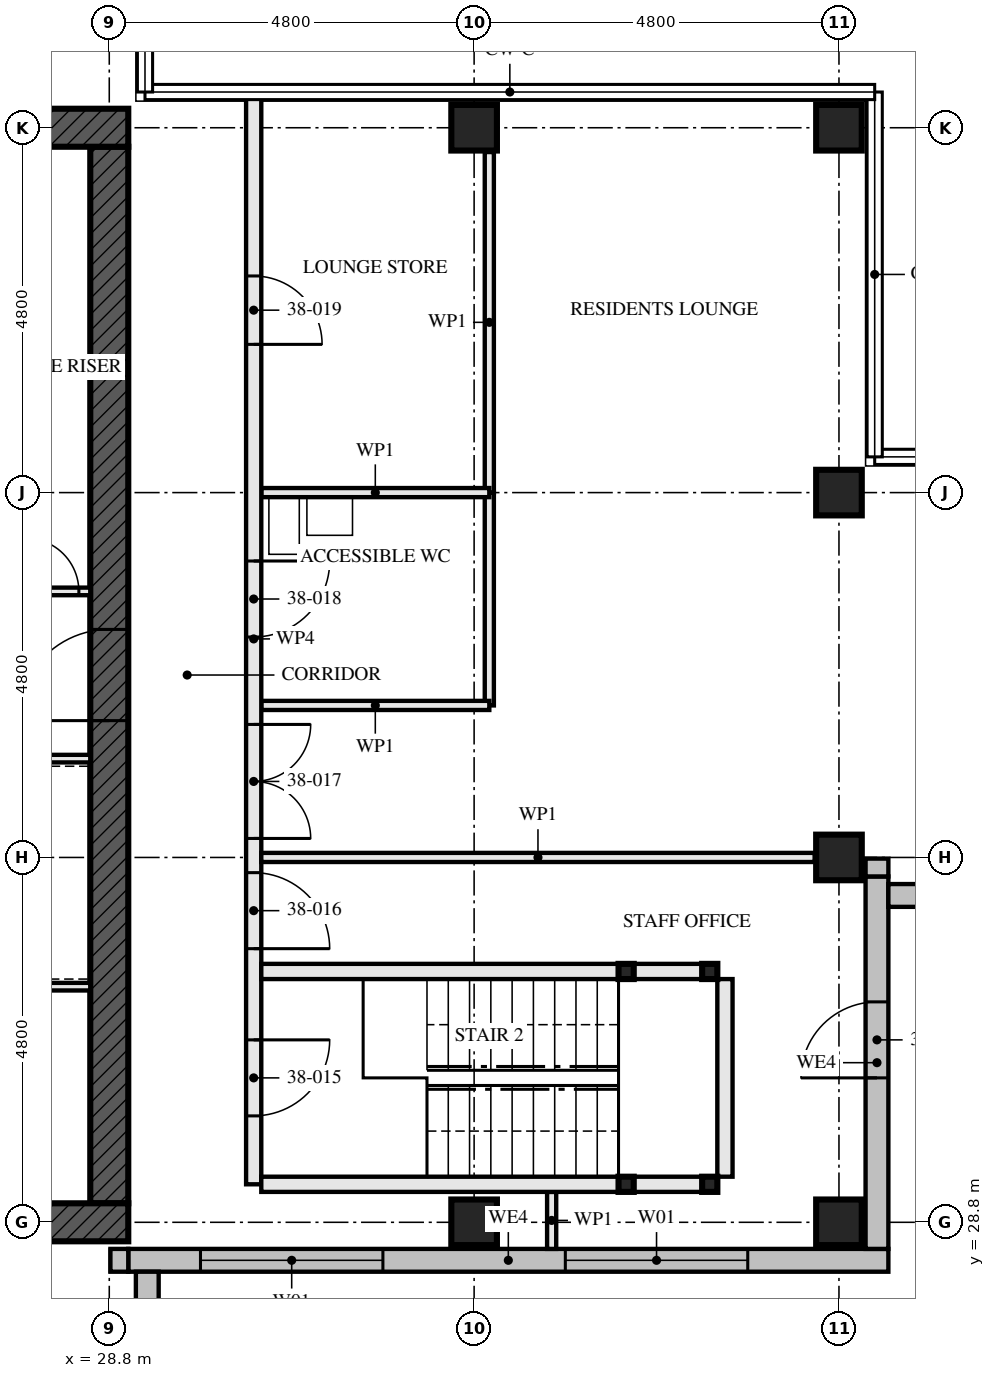
"""IFC4 building model, lengths in metres.
Left out: names, types, materials, properties, quantities, classifications, styles, units other than length and angle.
Written with IfcOpenShell. Run it as: python <this file> out.ifc"""

import sys

from ifc_helpers import new_model, si_unit, direction, frame, frame_2d, origin, origin_2d, place, context, subcontext, project, spatial, rectangle, hollow_rectangle, extrude, element, fill, save


model = new_model("IFC4")
c1 = context("Model", 3, precision=1e-05, world=origin(), true_north=direction((0.0, 1.0)))
c2 = subcontext(c1, "Body", "Model", "MODEL_VIEW")
j1 = project(units=[si_unit("LENGTHUNIT", "METRE"), si_unit("PLANEANGLEUNIT", "RADIAN")], contexts=[c1])
p1 = place(None, origin())
s1 = spatial("IfcSite", under=j1, at=p1, CompositionType="ELEMENT")
p2 = place(p1, origin())
s2 = spatial("IfcBuilding", under=s1, at=p2, CompositionType="ELEMENT")
p3 = place(p2, frame((0.0, 0.0, 141.0)))
s3 = spatial("IfcBuildingStorey", under=s2, at=p3, CompositionType="ELEMENT", Elevation=141.0)
for number, where, z_axis, x_axis in (
    (1, (33.6, 28.8, 0.0), (0.0, 0.0, 1.0), (0.0, 1.0, 0.0)),
    (2, (33.6, 43.2, 0.0), (0.0, 0.0, 1.0), (0.0, 1.0, 0.0)),
    (3, (38.4, 28.8, 0.0), (0.0, 0.0, 1.0), (0.0, 1.0, 0.0)),
    (4, (38.4, 33.6, 0.0), (0.0, 0.0, 1.0), (0.0, 1.0, 0.0)),
    (5, (38.4, 38.4, 0.0), (0.0, 0.0, 1.0), (0.0, 1.0, 0.0)),
    (6, (38.4, 43.2, 0.0), (0.0, 0.0, 1.0), (0.0, 1.0, 0.0)),
):
    element("IfcColumn", number, at=place(p3, frame(where, z_axis=z_axis, x_axis=x_axis)), inside=s3, PredefinedType="COLUMN", context=c2, shape_type="SweptSolid", body=[
        extrude(hollow_rectangle(XDim=0.6, YDim=0.6, WallThickness=0.08, at=origin_2d()), origin(), (0.0, 0.0, 1.0), 3.5),
    ])
p4 = place(p3, frame((14.15, 28.8, -0.17), z_axis=(0.0, 0.0, 1.0), x_axis=(1.0, 0.0, 0.0)))
e7 = element("IfcWall", 7, at=p4, inside=s3, PredefinedType="SHEAR", context=c2, shape_type="SweptSolid", body=[
    extrude(rectangle(XDim=14.9, YDim=0.5, at=frame_2d((7.45, 0.0))), origin(), (0.0, 0.0, 1.0), 3.5),
])
p5 = place(p4, frame((6.85, 0.0, 0.17)))
e8 = element("IfcOpeningElement", 8, at=p5, cuts=e7, PredefinedType="OPENING", context=c2, shape_type="SweptSolid", body=[
    extrude(rectangle(XDim=1.2, YDim=2.1, at=frame_2d((0.6, 1.05))), frame((0.0, 0.26, 0.0), z_axis=(0.0, -1.0, 0.0), x_axis=(1.0, 0.0, 0.0)), (0.0, 0.0, 1.0), 0.521),
])
p6 = place(p3, frame((29.05, 43.2, -0.17), z_axis=(0.0, 0.0, 1.0), x_axis=(-1.0, 0.0, 0.0)))
e9 = element("IfcWall", 9, at=p6, inside=s3, PredefinedType="SHEAR", context=c2, shape_type="SweptSolid", body=[
    extrude(rectangle(XDim=14.9, YDim=0.5, at=frame_2d((7.45, 0.0))), origin(), (0.0, 0.0, 1.0), 3.5),
])
p7 = place(p6, frame((6.85, 0.0, 0.17)))
e10 = element("IfcOpeningElement", 10, at=p7, cuts=e9, PredefinedType="OPENING", context=c2, shape_type="SweptSolid", body=[
    extrude(rectangle(XDim=1.2, YDim=2.1, at=frame_2d((0.6, 1.05))), frame((0.0, 0.26, 0.0), z_axis=(0.0, -1.0, 0.0), x_axis=(1.0, 0.0, 0.0)), (0.0, 0.0, 1.0), 0.521),
])
p8 = place(p3, frame((28.8, 29.05, -0.17), z_axis=(0.0, 0.0, 1.0), x_axis=(0.0, 1.0, 0.0)))
e11 = element("IfcWall", 11, at=p8, inside=s3, PredefinedType="SHEAR", context=c2, shape_type="SweptSolid", body=[
    extrude(rectangle(XDim=13.9, YDim=0.5, at=frame_2d((6.95, 0.0))), origin(), (0.0, 0.0, 1.0), 3.5),
])
p9 = place(p8, frame((6.35, 0.0, 0.17)))
e12 = element("IfcOpeningElement", 12, at=p9, cuts=e11, PredefinedType="OPENING", context=c2, shape_type="SweptSolid", body=[
    extrude(rectangle(XDim=1.2, YDim=2.1, at=frame_2d((0.6, 1.05))), frame((0.0, 0.26, 0.0), z_axis=(0.0, -1.0, 0.0), x_axis=(1.0, 0.0, 0.0)), (0.0, 0.0, 1.0), 0.521),
])
for number, where, z_axis, x_axis in (
    (13, (36.7, 29.3, 0.0), (0.0, 0.0, 1.0), (1.0, 0.0, 0.0)),
    (14, (36.7, 32.1, 0.0), (0.0, 0.0, 1.0), (1.0, 0.0, 0.0)),
    (15, (35.6, 29.3, 0.0), (0.0, 0.0, 1.0), (1.0, 0.0, 0.0)),
    (16, (35.6, 32.1, 0.0), (0.0, 0.0, 1.0), (1.0, 0.0, 0.0)),
):
    element("IfcColumn", number, at=place(p3, frame(where, z_axis=z_axis, x_axis=x_axis)), inside=s3, PredefinedType="COLUMN", context=c2, shape_type="SweptSolid", body=[
        extrude(hollow_rectangle(XDim=0.2, YDim=0.2, WallThickness=0.008, at=origin_2d()), origin(), (0.0, 0.0, 1.0), 3.33),
    ])
p10 = place(p3, frame((29.05, 28.3, 0.0), z_axis=(0.0, 0.0, 1.0), x_axis=(1.0, 0.0, 0.0)))
e17 = element("IfcWall", 17, at=p10, inside=s3, PredefinedType="SOLIDWALL", context=c2, shape_type="SweptSolid", body=[
    extrude(rectangle(XDim=10.0, YDim=0.3, at=frame_2d((5.0, 0.0))), origin(), (0.0, 0.0, 1.0), 3.5),
])
p11 = place(p10, frame((0.95, 0.0, 0.6)))
e18 = element("IfcOpeningElement", 18, at=p11, cuts=e17, PredefinedType="OPENING", context=c2, shape_type="SweptSolid", body=[
    extrude(rectangle(XDim=2.4, YDim=1.8, at=frame_2d((1.2, 0.9))), frame((0.0, 0.161, 0.0), z_axis=(0.0, -1.0, 0.0), x_axis=(1.0, 0.0, 0.0)), (0.0, 0.0, 1.0), 0.321),
])
p12 = place(p10, frame((5.75, 0.0, 0.6)))
e19 = element("IfcOpeningElement", 19, at=p12, cuts=e17, PredefinedType="OPENING", context=c2, shape_type="SweptSolid", body=[
    extrude(rectangle(XDim=2.4, YDim=1.8, at=frame_2d((1.2, 0.9))), frame((0.0, 0.161, 0.0), z_axis=(0.0, -1.0, 0.0), x_axis=(1.0, 0.0, 0.0)), (0.0, 0.0, 1.0), 0.321),
])
p13 = place(p3, frame((38.9, 28.45, 0.0), z_axis=(0.0, 0.0, 1.0), x_axis=(0.0, 1.0, 0.0)))
e20 = element("IfcWall", 20, at=p13, inside=s3, PredefinedType="SOLIDWALL", context=c2, shape_type="SweptSolid", body=[
    extrude(rectangle(XDim=4.9, YDim=0.3, at=frame_2d((2.45, 0.0))), origin(), (0.0, 0.0, 1.0), 3.5),
])
p14 = place(p13, frame((2.25, 0.0, 0.0)))
e21 = element("IfcOpeningElement", 21, at=p14, cuts=e20, PredefinedType="OPENING", context=c2, shape_type="SweptSolid", body=[
    extrude(rectangle(XDim=1.0, YDim=2.4, at=frame_2d((0.5, 1.2))), frame((0.0, 0.161, 0.0), z_axis=(0.0, -1.0, 0.0), x_axis=(1.0, 0.0, 0.0)), (0.0, 0.0, 1.0), 0.321),
])
p15 = place(p3, frame((39.05, 33.1, 0.0), z_axis=(0.0, 0.0, 1.0), x_axis=(1.0, 0.0, 0.0)))
e22 = element("IfcWall", 22, at=p15, inside=s3, PredefinedType="SOLIDWALL", context=c2, shape_type="SweptSolid", body=[
    extrude(rectangle(XDim=4.5, YDim=0.3, at=frame_2d((2.25, 0.0))), origin(), (0.0, 0.0, 1.0), 3.5),
])
p16 = place(p15, frame((1.25, 0.0, 0.0)))
e23 = element("IfcOpeningElement", 23, at=p16, cuts=e22, PredefinedType="OPENING", context=c2, shape_type="SweptSolid", body=[
    extrude(rectangle(XDim=1.0, YDim=2.4, at=frame_2d((0.5, 1.2))), frame((0.0, 0.161, 0.0), z_axis=(0.0, -1.0, 0.0), x_axis=(1.0, 0.0, 0.0)), (0.0, 0.0, 1.0), 0.321),
])
p17 = place(p3, frame((29.3, 18.85, 0.0), z_axis=(0.0, 0.0, 1.0), x_axis=(0.0, 1.0, 0.0)))
e24 = element("IfcWall", 24, at=p17, inside=s3, PredefinedType="SOLIDWALL", context=c2, shape_type="SweptSolid", body=[
    extrude(rectangle(XDim=9.3, YDim=0.3, at=frame_2d((4.65, 0.0))), origin(), (0.0, 0.0, 1.0), 3.5),
])
p18 = place(p17, frame((2.25, 0.0, 0.0)))
e25 = element("IfcOpeningElement", 25, at=p18, cuts=e24, PredefinedType="OPENING", context=c2, shape_type="SweptSolid", body=[
    extrude(rectangle(XDim=1.0, YDim=2.4, at=frame_2d((0.5, 1.2))), frame((0.0, 0.161, 0.0), z_axis=(0.0, -1.0, 0.0), x_axis=(1.0, 0.0, 0.0)), (0.0, 0.0, 1.0), 0.321),
])
p19 = place(p17, frame((6.35, 0.0, 0.6)))
e26 = element("IfcOpeningElement", 26, at=p19, cuts=e24, PredefinedType="OPENING", context=c2, shape_type="SweptSolid", body=[
    extrude(rectangle(XDim=2.4, YDim=1.8, at=frame_2d((1.2, 0.9))), frame((0.0, 0.161, 0.0), z_axis=(0.0, -1.0, 0.0), x_axis=(1.0, 0.0, 0.0)), (0.0, 0.0, 1.0), 0.321),
])
p20 = place(p3, frame((28.815, 28.3, 2.39), z_axis=(0.0, 0.0, 1.0), x_axis=(1.0, 0.0, 0.0)))
e27 = element("IfcWall", 27, at=p20, inside=s3, PredefinedType="SOLIDWALL", context=c2, shape_type="SweptSolid", body=[
    extrude(rectangle(XDim=0.235, YDim=0.3, at=frame_2d((0.118, 0.0))), origin(), (0.0, 0.0, 1.0), 0.88),
])
p21 = place(p3, frame((38.9, 33.35, 2.39), z_axis=(0.0, 0.0, 1.0), x_axis=(0.0, 1.0, 0.0)))
e28 = element("IfcWall", 28, at=p21, inside=s3, PredefinedType="SOLIDWALL", context=c2, shape_type="SweptSolid", body=[
    extrude(rectangle(XDim=0.235, YDim=0.3, at=frame_2d((0.117, 0.0))), origin(), (0.0, 0.0, 1.0), 0.88),
])
p22 = place(p3, frame((36.6, 29.3, 0.0), z_axis=(0.0, 0.0, 1.0), x_axis=(-1.0, 0.0, 0.0)))
e29 = element("IfcWall", 29, at=p22, inside=s3, PredefinedType="SOLIDWALL", context=c2, shape_type="SweptSolid", body=[
    extrude(rectangle(XDim=0.9, YDim=0.2, at=frame_2d((0.45, 0.0))), origin(), (0.0, 0.0, 1.0), 2.99),
])
p23 = place(p3, frame((35.5, 29.3, 0.0), z_axis=(0.0, 0.0, 1.0), x_axis=(-1.0, 0.0, 0.0)))
e30 = element("IfcWall", 30, at=p23, inside=s3, PredefinedType="SOLIDWALL", context=c2, shape_type="SweptSolid", body=[
    extrude(rectangle(XDim=4.7, YDim=0.2, at=frame_2d((2.35, 0.0))), origin(), (0.0, 0.0, 1.0), 2.99),
])
p24 = place(p3, frame((36.6, 32.1, 0.0), z_axis=(0.0, 0.0, 1.0), x_axis=(-1.0, 0.0, 0.0)))
e31 = element("IfcWall", 31, at=p24, inside=s3, PredefinedType="SOLIDWALL", context=c2, shape_type="SweptSolid", body=[
    extrude(rectangle(XDim=0.9, YDim=0.2, at=frame_2d((0.45, 0.0))), origin(), (0.0, 0.0, 1.0), 2.99),
])
p25 = place(p3, frame((35.5, 32.1, 0.0), z_axis=(0.0, 0.0, 1.0), x_axis=(-1.0, 0.0, 0.0)))
e32 = element("IfcWall", 32, at=p25, inside=s3, PredefinedType="SOLIDWALL", context=c2, shape_type="SweptSolid", body=[
    extrude(rectangle(XDim=4.7, YDim=0.2, at=frame_2d((2.35, 0.0))), origin(), (0.0, 0.0, 1.0), 2.99),
])
p26 = place(p3, frame((36.9, 29.4, 0.0), z_axis=(0.0, 0.0, 1.0), x_axis=(0.0, 1.0, 0.0)))
e33 = element("IfcWall", 33, at=p26, inside=s3, PredefinedType="SOLIDWALL", context=c2, shape_type="SweptSolid", body=[
    extrude(rectangle(XDim=2.6, YDim=0.2, at=frame_2d((1.3, 0.0))), origin(), (0.0, 0.0, 1.0), 3.33),
])
p27 = place(p3, frame((33.8, 35.6, 0.0), z_axis=(0.0, 0.0, 1.0), x_axis=(-1.0, 0.0, 0.0)))
e34 = element("IfcWall", 34, at=p27, inside=s3, PredefinedType="PARTITIONING", context=c2, shape_type="SweptSolid", body=[
    extrude(rectangle(XDim=3.0, YDim=0.12, at=frame_2d((1.5, 0.0))), origin(), (0.0, 0.0, 1.0), 3.33),
])
p28 = place(p3, frame((33.8, 35.6, 0.0), z_axis=(0.0, 0.0, 1.0), x_axis=(0.0, 1.0, 0.0)))
e35 = element("IfcWall", 35, at=p28, inside=s3, PredefinedType="PARTITIONING", context=c2, shape_type="SweptSolid", body=[
    extrude(rectangle(XDim=2.8, YDim=0.12, at=frame_2d((1.4, 0.0))), origin(), (0.0, 0.0, 1.0), 3.33),
])
p29 = place(p3, frame((33.8, 38.4, 0.0), z_axis=(0.0, 0.0, 1.0), x_axis=(-1.0, 0.0, 0.0)))
e36 = element("IfcWall", 36, at=p29, inside=s3, PredefinedType="PARTITIONING", context=c2, shape_type="SweptSolid", body=[
    extrude(rectangle(XDim=3.0, YDim=0.12, at=frame_2d((1.5, 0.0))), origin(), (0.0, 0.0, 1.0), 2.55),
])
p30 = place(p3, frame((33.8, 38.4, 0.0), z_axis=(0.0, 0.0, 1.0), x_axis=(0.0, 1.0, 0.0)))
e37 = element("IfcWall", 37, at=p30, inside=s3, PredefinedType="PARTITIONING", context=c2, shape_type="SweptSolid", body=[
    extrude(rectangle(XDim=4.48, YDim=0.12, at=frame_2d((2.24, 0.0))), origin(), (0.0, 0.0, 1.0), 3.33),
])
p31 = place(p3, frame((38.08, 33.6, 0.0), z_axis=(0.0, 0.0, 1.0), x_axis=(-1.0, 0.0, 0.0)))
e38 = element("IfcWall", 38, at=p31, inside=s3, PredefinedType="PARTITIONING", context=c2, shape_type="SweptSolid", body=[
    extrude(rectangle(XDim=7.28, YDim=0.12, at=frame_2d((3.64, 0.0))), origin(), (0.0, 0.0, 1.0), 2.55),
])
p32 = place(p3, frame((34.62, 28.45, 0.0), z_axis=(0.0, 0.0, 1.0), x_axis=(0.0, 1.0, 0.0)))
e39 = element("IfcWall", 39, at=p32, inside=s3, PredefinedType="PARTITIONING", context=c2, shape_type="SweptSolid", body=[
    extrude(rectangle(XDim=0.75, YDim=0.12, at=frame_2d((0.375, 0.0))), origin(), (0.0, 0.0, 1.0), 2.32),
])
p33 = place(p3, frame((30.7, 29.3, 0.0), z_axis=(0.0, 0.0, 1.0), x_axis=(0.0, 1.0, 0.0)))
e40 = element("IfcWall", 40, at=p33, inside=s3, PredefinedType="PARTITIONING", context=c2, shape_type="SweptSolid", body=[
    extrude(rectangle(XDim=14.35, YDim=0.2, at=frame_2d((7.175, 0.0))), origin(), (0.0, 0.0, 1.0), 2.32),
])
p34 = place(p33, frame((0.9, 0.0, 0.0)))
e41 = element("IfcOpeningElement", 41, at=p34, cuts=e40, PredefinedType="OPENING", context=c2, shape_type="SweptSolid", body=[
    extrude(rectangle(XDim=1.0, YDim=2.1, at=frame_2d((0.5, 1.05))), frame((0.0, 0.111, 0.0), z_axis=(0.0, -1.0, 0.0), x_axis=(1.0, 0.0, 0.0)), (0.0, 0.0, 1.0), 0.221),
])
p35 = place(p33, frame((3.1, 0.0, 0.0)))
e42 = element("IfcOpeningElement", 42, at=p35, cuts=e40, PredefinedType="OPENING", context=c2, shape_type="SweptSolid", body=[
    extrude(rectangle(XDim=1.0, YDim=2.0, at=frame_2d((0.5, 1.0))), frame((0.0, 0.111, 0.0), z_axis=(0.0, -1.0, 0.0), x_axis=(1.0, 0.0, 0.0)), (0.0, 0.0, 1.0), 0.221),
])
p36 = place(p33, frame((4.55, 0.0, 0.0)))
e43 = element("IfcOpeningElement", 43, at=p36, cuts=e40, PredefinedType="OPENING", context=c2, shape_type="SweptSolid", body=[
    extrude(rectangle(XDim=1.5, YDim=2.1, at=frame_2d((0.75, 1.05))), frame((0.0, 0.111, 0.0), z_axis=(0.0, -1.0, 0.0), x_axis=(1.0, 0.0, 0.0)), (0.0, 0.0, 1.0), 0.221),
])
p37 = place(p33, frame((7.2, 0.0, 0.0)))
e44 = element("IfcOpeningElement", 44, at=p37, cuts=e40, PredefinedType="OPENING", context=c2, shape_type="SweptSolid", body=[
    extrude(rectangle(XDim=1.0, YDim=2.1, at=frame_2d((0.5, 1.05))), frame((0.0, 0.111, 0.0), z_axis=(0.0, -1.0, 0.0), x_axis=(1.0, 0.0, 0.0)), (0.0, 0.0, 1.0), 0.221),
])
p38 = place(p33, frame((11.05, 0.0, 0.0)))
e45 = element("IfcOpeningElement", 45, at=p38, cuts=e40, PredefinedType="OPENING", context=c2, shape_type="SweptSolid", body=[
    extrude(rectangle(XDim=0.9, YDim=2.1, at=frame_2d((0.45, 1.05))), frame((0.0, 0.111, 0.0), z_axis=(0.0, -1.0, 0.0), x_axis=(1.0, 0.0, 0.0)), (0.0, 0.0, 1.0), 0.221),
])
p39 = place(p3, frame((23.05, 34.9, 0.0), z_axis=(0.0, 0.0, 1.0), x_axis=(1.0, 0.0, 0.0)))
e46 = element("IfcWall", 46, at=p39, inside=s3, PredefinedType="SOLIDWALL", context=c2, shape_type="SweptSolid", body=[
    extrude(rectangle(XDim=5.5, YDim=0.1, at=frame_2d((2.75, 0.0))), origin(), (0.0, 0.0, 1.0), 3.33),
])
p40 = place(p39, frame((0.85, 0.0, 0.0)))
e47 = element("IfcOpeningElement", 47, at=p40, cuts=e46, PredefinedType="OPENING", context=c2, shape_type="SweptSolid", body=[
    extrude(rectangle(XDim=1.0, YDim=2.1, at=frame_2d((0.5, 1.05))), frame((0.0, 0.061, 0.0), z_axis=(0.0, -1.0, 0.0), x_axis=(1.0, 0.0, 0.0)), (0.0, 0.0, 1.0), 0.121),
])
p41 = place(p39, frame((3.625, 0.0, 0.0)))
e48 = element("IfcOpeningElement", 48, at=p41, cuts=e46, PredefinedType="OPENING", context=c2, shape_type="SweptSolid", body=[
    extrude(rectangle(XDim=1.0, YDim=2.1, at=frame_2d((0.5, 1.05))), frame((0.0, 0.061, 0.0), z_axis=(0.0, -1.0, 0.0), x_axis=(1.0, 0.0, 0.0)), (0.0, 0.0, 1.0), 0.121),
])
p42 = place(p3, frame((22.65, 37.1, 0.0), z_axis=(0.0, 0.0, 1.0), x_axis=(1.0, 0.0, 0.0)))
e49 = element("IfcWall", 49, at=p42, inside=s3, PredefinedType="SOLIDWALL", context=c2, shape_type="SweptSolid", body=[
    extrude(rectangle(XDim=5.9, YDim=0.1, at=frame_2d((2.95, 0.0))), origin(), (0.0, 0.0, 1.0), 3.33),
])
p43 = place(p42, frame((3.45, 0.0, 0.0)))
e50 = element("IfcOpeningElement", 50, at=p43, cuts=e49, PredefinedType="OPENING", context=c2, shape_type="SweptSolid", body=[
    extrude(rectangle(XDim=1.0, YDim=2.1, at=frame_2d((0.5, 1.05))), frame((0.0, 0.061, 0.0), z_axis=(0.0, -1.0, 0.0), x_axis=(1.0, 0.0, 0.0)), (0.0, 0.0, 1.0), 0.121),
])
p44 = place(p42, frame((5.05, 0.0, 0.0)))
e51 = element("IfcOpeningElement", 51, at=p44, cuts=e49, PredefinedType="OPENING", context=c2, shape_type="SweptSolid", body=[
    extrude(rectangle(XDim=0.7, YDim=2.1, at=frame_2d((0.35, 1.05))), frame((0.0, 0.061, 0.0), z_axis=(0.0, -1.0, 0.0), x_axis=(1.0, 0.0, 0.0)), (0.0, 0.0, 1.0), 0.121),
])
p45 = place(p3, frame((23.15, 31.9, 0.0), z_axis=(0.0, 0.0, 1.0), x_axis=(1.0, 0.0, 0.0)))
e52 = element("IfcWall", 52, at=p45, inside=s3, PredefinedType="SOLIDWALL", context=c2, shape_type="SweptSolid", body=[
    extrude(rectangle(XDim=5.4, YDim=0.1, at=frame_2d((2.7, 0.0))), origin(), (0.0, 0.0, 1.0), 3.33),
])
p46 = place(p11, origin())
e53 = element("IfcWindow", 53, at=p46, inside=s3, PartitioningType="SINGLE_PANEL", PredefinedType="WINDOW", context=c2, shape_type="SweptSolid", body=[
    extrude(rectangle(XDim=2.4, YDim=1.8, at=frame_2d((1.2, 0.9))), frame((0.0, 0.03, 0.0), z_axis=(0.0, -1.0, 0.0), x_axis=(1.0, 0.0, 0.0)), (0.0, 0.0, 1.0), 0.06),
])
fill(e18, e53)
p47 = place(p12, origin())
e54 = element("IfcWindow", 54, at=p47, inside=s3, PartitioningType="SINGLE_PANEL", PredefinedType="WINDOW", context=c2, shape_type="SweptSolid", body=[
    extrude(rectangle(XDim=2.4, YDim=1.8, at=frame_2d((1.2, 0.9))), frame((0.0, 0.03, 0.0), z_axis=(0.0, -1.0, 0.0), x_axis=(1.0, 0.0, 0.0)), (0.0, 0.0, 1.0), 0.06),
])
fill(e19, e54)
p48 = place(p14, origin())
e55 = element("IfcDoor", 55, at=p48, inside=s3, OperationType="SINGLE_SWING_LEFT", PredefinedType="DOOR", context=c2, shape_type="SweptSolid", body=[
    extrude(rectangle(XDim=1.0, YDim=2.4, at=frame_2d((0.5, 1.2))), frame((0.0, 0.035, 0.0), z_axis=(0.0, -1.0, 0.0), x_axis=(1.0, 0.0, 0.0)), (0.0, 0.0, 1.0), 0.07),
])
fill(e21, e55)
p49 = place(p34, frame((1.0, 0.0, 0.0), z_axis=(0.0, 0.0, 1.0), x_axis=(-1.0, 0.0, 0.0)))
e56 = element("IfcDoor", 56, at=p49, inside=s3, OperationType="SINGLE_SWING_RIGHT", PredefinedType="DOOR", context=c2, shape_type="SweptSolid", body=[
    extrude(rectangle(XDim=1.0, YDim=2.1, at=frame_2d((0.5, 1.05))), frame((0.0, 0.032, 0.0), z_axis=(0.0, -1.0, 0.0), x_axis=(1.0, 0.0, 0.0)), (0.0, 0.0, 1.0), 0.064),
])
fill(e41, e56)
p50 = place(p35, frame((1.0, 0.0, 0.0), z_axis=(0.0, 0.0, 1.0), x_axis=(-1.0, 0.0, 0.0)))
e57 = element("IfcDoor", 57, at=p50, inside=s3, OperationType="SINGLE_SWING_LEFT", PredefinedType="DOOR", context=c2, shape_type="SweptSolid", body=[
    extrude(rectangle(XDim=1.0, YDim=2.0, at=frame_2d((0.5, 1.0))), frame((0.0, 0.027, 0.0), z_axis=(0.0, -1.0, 0.0), x_axis=(1.0, 0.0, 0.0)), (0.0, 0.0, 1.0), 0.054),
])
fill(e42, e57)
p51 = place(p36, frame((1.5, 0.0, 0.0), z_axis=(0.0, 0.0, 1.0), x_axis=(-1.0, 0.0, 0.0)))
e58 = element("IfcDoor", 58, at=p51, inside=s3, OperationType="DOUBLE_DOOR_SINGLE_SWING", PredefinedType="DOOR", context=c2, shape_type="SweptSolid", body=[
    extrude(rectangle(XDim=1.5, YDim=2.1, at=frame_2d((0.75, 1.05))), frame((0.0, 0.027, 0.0), z_axis=(0.0, -1.0, 0.0), x_axis=(1.0, 0.0, 0.0)), (0.0, 0.0, 1.0), 0.054),
])
fill(e43, e58)
p52 = place(p37, frame((1.0, 0.0, 0.0), z_axis=(0.0, 0.0, 1.0), x_axis=(-1.0, 0.0, 0.0)))
e59 = element("IfcDoor", 59, at=p52, inside=s3, OperationType="SINGLE_SWING_RIGHT", PredefinedType="DOOR", context=c2, shape_type="SweptSolid", body=[
    extrude(rectangle(XDim=1.0, YDim=2.1, at=frame_2d((0.5, 1.05))), frame((0.0, 0.027, 0.0), z_axis=(0.0, -1.0, 0.0), x_axis=(1.0, 0.0, 0.0)), (0.0, 0.0, 1.0), 0.054),
])
fill(e44, e59)
p53 = place(p38, frame((0.9, 0.0, 0.0), z_axis=(0.0, 0.0, 1.0), x_axis=(-1.0, 0.0, 0.0)))
e60 = element("IfcDoor", 60, at=p53, inside=s3, OperationType="SINGLE_SWING_LEFT", PredefinedType="DOOR", context=c2, shape_type="SweptSolid", body=[
    extrude(rectangle(XDim=0.9, YDim=2.1, at=frame_2d((0.45, 1.05))), frame((0.0, 0.027, 0.0), z_axis=(0.0, -1.0, 0.0), x_axis=(1.0, 0.0, 0.0)), (0.0, 0.0, 1.0), 0.054),
])
fill(e45, e60)
p54 = place(p44, origin())
e61 = element("IfcDoor", 61, at=p54, inside=s3, OperationType="SINGLE_SWING_RIGHT", PredefinedType="DOOR", context=c2, shape_type="SweptSolid", body=[
    extrude(rectangle(XDim=0.7, YDim=2.1, at=frame_2d((0.35, 1.05))), frame((0.0, 0.027, 0.0), z_axis=(0.0, -1.0, 0.0), x_axis=(1.0, 0.0, 0.0)), (0.0, 0.0, 1.0), 0.054),
])
fill(e51, e61)
p55 = place(p9, origin())
e62 = element("IfcDoor", 62, at=p55, inside=s3, OperationType="SINGLE_SWING_LEFT", PredefinedType="DOOR", context=c2, shape_type="SweptSolid", body=[
    extrude(rectangle(XDim=1.2, YDim=2.1, at=frame_2d((0.6, 1.05))), frame((0.0, 0.027, 0.0), z_axis=(0.0, -1.0, 0.0), x_axis=(1.0, 0.0, 0.0)), (0.0, 0.0, 1.0), 0.054),
])
fill(e12, e62)
save(model, sys.argv[1])
